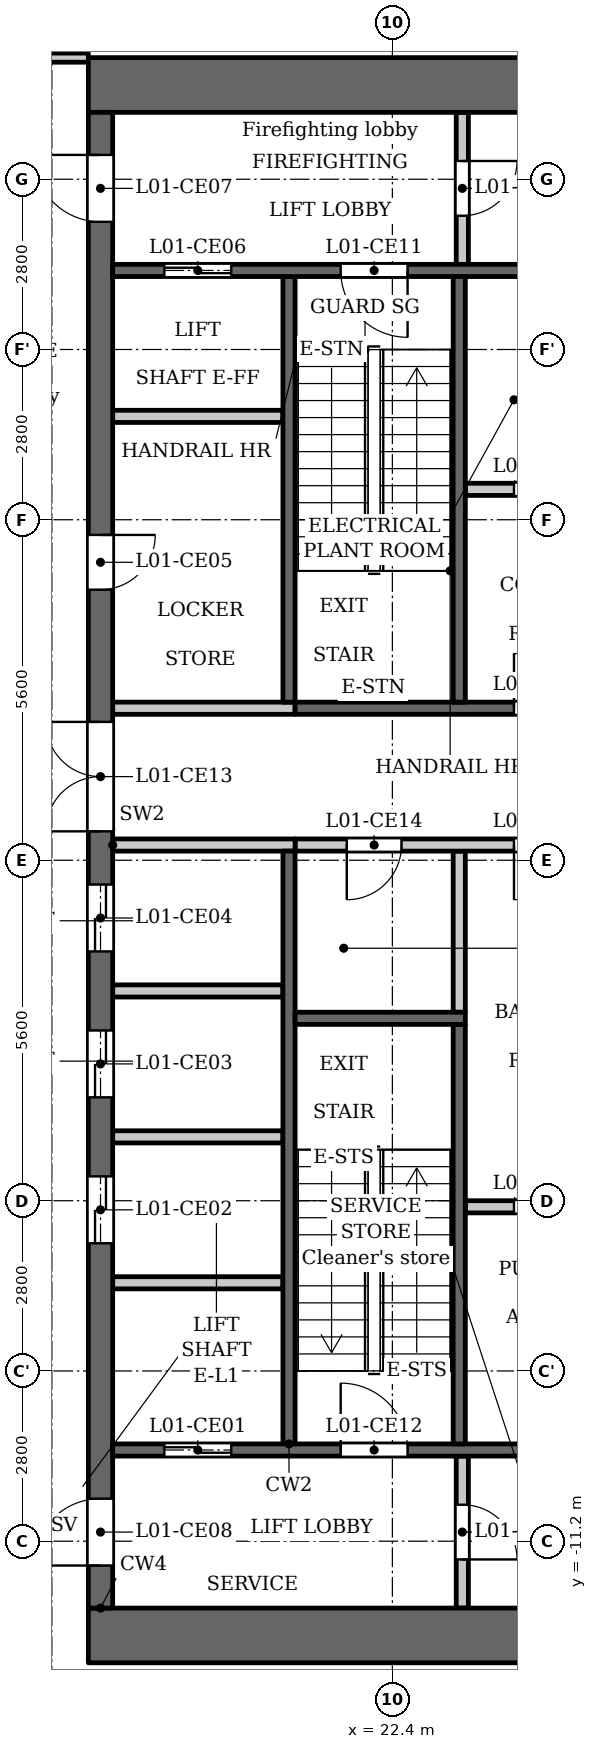
"""IFC4 building model, lengths in metres.
Left out: names, types, materials, properties, quantities, classifications, styles, units other than length and angle.
Written with IfcOpenShell. Run it as: python <this file> out.ifc"""

import sys

from ifc_helpers import new_model, si_unit, direction, frame, frame_2d, origin, place, context, subcontext, project, spatial, rectangle, extrude, element, fill, save


model = new_model("IFC4")
c1 = context("Model", 3, precision=1e-05, world=origin(), true_north=direction((0.0, 1.0)))
c2 = subcontext(c1, "Body", "Model", "MODEL_VIEW")
j1 = project(units=[si_unit("LENGTHUNIT", "METRE"), si_unit("PLANEANGLEUNIT", "RADIAN")], contexts=[c1])
p1 = place(None, origin())
s1 = spatial("IfcSite", under=j1, at=p1, CompositionType="ELEMENT")
p2 = place(p1, origin())
s2 = spatial("IfcBuilding", under=s1, at=p2, CompositionType="ELEMENT")
p3 = place(p2, frame((0.0, 0.0, 6.5)))
s3 = spatial("IfcBuildingStorey", under=s2, at=p3, CompositionType="ELEMENT", Elevation=6.5)
p4 = place(p3, frame((23.5, -2.5, 0.0), z_axis=(0.0, 0.0, 1.0), x_axis=(0.0, 1.0, 0.0)))
e1 = element("IfcWall", 1, at=p4, inside=s3, PredefinedType="PARTITIONING", context=c2, shape_type="SweptSolid", body=[
    extrude(rectangle(XDim=2.65, YDim=0.2, at=frame_2d((1.325, 0.0))), origin(), (0.0, 0.0, 1.0), 4.45),
])
p5 = place(p3, frame((20.7, 2.6, 0.0), z_axis=(0.0, 0.0, 1.0), x_axis=(0.0, 1.0, 0.0)))
e2 = element("IfcWall", 2, at=p5, inside=s3, PredefinedType="SHEAR", context=c2, shape_type="SweptSolid", body=[
    extrude(rectangle(XDim=7.0, YDim=0.2, at=frame_2d((3.5, 0.0))), origin(), (0.0, 0.0, 1.0), 4.45),
])
p6 = place(p3, frame((20.7, -9.6, 0.0), z_axis=(0.0, 0.0, 1.0), x_axis=(0.0, 1.0, 0.0)))
e3 = element("IfcWall", 3, at=p6, inside=s3, PredefinedType="SHEAR", context=c2, shape_type="SweptSolid", body=[
    extrude(rectangle(XDim=9.75, YDim=0.2, at=frame_2d((4.875, 0.0))), origin(), (0.0, 0.0, 1.0), 4.45),
])
p7 = place(p3, frame((20.8, 2.5, 0.0), z_axis=(0.0, 0.0, 1.0), x_axis=(1.0, 0.0, 0.0)))
e4 = element("IfcWall", 4, at=p7, inside=s3, PredefinedType="SHEAR", context=c2, shape_type="SweptSolid", body=[
    extrude(rectangle(XDim=5.3, YDim=0.2, at=frame_2d((2.65, 0.0))), origin(), (0.0, 0.0, 1.0), 4.45),
])
p8 = place(p7, frame((3.6, 0.0, 0.0)))
e5 = element("IfcOpeningElement", 5, at=p8, cuts=e4, PredefinedType="OPENING", context=c2, shape_type="SweptSolid", body=[
    extrude(rectangle(XDim=0.9, YDim=2.1, at=frame_2d((0.45, 1.05))), frame((0.0, 0.11, 0.0), z_axis=(0.0, -1.0, 0.0), x_axis=(1.0, 0.0, 0.0)), (0.0, 0.0, 1.0), 0.22),
])
p9 = place(p3, frame((20.8, 0.25, 0.0), z_axis=(0.0, 0.0, 1.0), x_axis=(1.0, 0.0, 0.0)))
e6 = element("IfcWall", 6, at=p9, inside=s3, PredefinedType="PARTITIONING", context=c2, shape_type="SweptSolid", body=[
    extrude(rectangle(XDim=5.3, YDim=0.2, at=frame_2d((2.65, 0.0))), origin(), (0.0, 0.0, 1.0), 4.45),
])
p10 = place(p9, frame((0.85, 0.0, 0.0)))
e7 = element("IfcOpeningElement", 7, at=p10, cuts=e6, PredefinedType="OPENING", context=c2, shape_type="SweptSolid", body=[
    extrude(rectangle(XDim=0.9, YDim=2.1, at=frame_2d((0.45, 1.05))), frame((0.0, 0.11, 0.0), z_axis=(0.0, -1.0, 0.0), x_axis=(1.0, 0.0, 0.0)), (0.0, 0.0, 1.0), 0.22),
])
p11 = place(p9, frame((3.6, 0.0, 0.0)))
e8 = element("IfcOpeningElement", 8, at=p11, cuts=e6, PredefinedType="OPENING", context=c2, shape_type="SweptSolid", body=[
    extrude(rectangle(XDim=0.9, YDim=2.1, at=frame_2d((0.45, 1.05))), frame((0.0, 0.11, 0.0), z_axis=(0.0, -1.0, 0.0), x_axis=(1.0, 0.0, 0.0)), (0.0, 0.0, 1.0), 0.22),
])
for number, where, z_axis, x_axis in (
    (9, (17.4, 12.75, 0.0), (0.0, 0.0, 1.0), (1.0, 0.0, 0.0)),
    (10, (17.4, -12.75, 0.0), (0.0, 0.0, 1.0), (1.0, 0.0, 0.0)),
):
    element("IfcWall", number, at=place(p3, frame(where, z_axis=z_axis, x_axis=x_axis)), inside=s3, PredefinedType="SHEAR", context=c2, shape_type="SweptSolid", body=[
        extrude(rectangle(XDim=10.4, YDim=0.9, at=frame_2d((5.2, 0.0))), origin(), (0.0, 0.0, 1.0), 4.45),
    ])
p12 = place(p3, frame((17.6, -12.3, 0.0), z_axis=(0.0, 0.0, 1.0), x_axis=(0.0, 1.0, 0.0)))
e11 = element("IfcWall", 11, at=p12, inside=s3, PredefinedType="SHEAR", context=c2, shape_type="SweptSolid", body=[
    extrude(rectangle(XDim=24.6, YDim=0.4, at=frame_2d((12.3, 0.0))), origin(), (0.0, 0.0, 1.0), 4.45),
])
p13 = place(p12, frame((6.0, 0.0, 0.0)))
e12 = element("IfcOpeningElement", 12, at=p13, cuts=e11, PredefinedType="OPENING", context=c2, shape_type="SweptSolid", body=[
    extrude(rectangle(XDim=1.1, YDim=2.1, at=frame_2d((0.55, 1.05))), frame((0.0, 0.21, 0.0), z_axis=(0.0, -1.0, 0.0), x_axis=(1.0, 0.0, 0.0)), (0.0, 0.0, 1.0), 0.42),
])
p14 = place(p12, frame((8.4, 0.0, 0.0)))
e13 = element("IfcOpeningElement", 13, at=p14, cuts=e11, PredefinedType="OPENING", context=c2, shape_type="SweptSolid", body=[
    extrude(rectangle(XDim=1.1, YDim=2.1, at=frame_2d((0.55, 1.05))), frame((0.0, 0.21, 0.0), z_axis=(0.0, -1.0, 0.0), x_axis=(1.0, 0.0, 0.0)), (0.0, 0.0, 1.0), 0.42),
])
p15 = place(p12, frame((10.8, 0.0, 0.0)))
e14 = element("IfcOpeningElement", 14, at=p15, cuts=e11, PredefinedType="OPENING", context=c2, shape_type="SweptSolid", body=[
    extrude(rectangle(XDim=1.1, YDim=2.1, at=frame_2d((0.55, 1.05))), frame((0.0, 0.21, 0.0), z_axis=(0.0, -1.0, 0.0), x_axis=(1.0, 0.0, 0.0)), (0.0, 0.0, 1.0), 0.42),
])
p16 = place(p12, frame((16.75, 0.0, 0.0)))
e15 = element("IfcOpeningElement", 15, at=p16, cuts=e11, PredefinedType="OPENING", context=c2, shape_type="SweptSolid", body=[
    extrude(rectangle(XDim=0.9, YDim=2.1, at=frame_2d((0.45, 1.05))), frame((0.0, 0.21, 0.0), z_axis=(0.0, -1.0, 0.0), x_axis=(1.0, 0.0, 0.0)), (0.0, 0.0, 1.0), 0.42),
])
p17 = place(p12, frame((22.8, 0.0, 0.0)))
e16 = element("IfcOpeningElement", 16, at=p17, cuts=e11, PredefinedType="OPENING", context=c2, shape_type="SweptSolid", body=[
    extrude(rectangle(XDim=1.1, YDim=2.1, at=frame_2d((0.55, 1.05))), frame((0.0, 0.21, 0.0), z_axis=(0.0, -1.0, 0.0), x_axis=(1.0, 0.0, 0.0)), (0.0, 0.0, 1.0), 0.42),
])
p18 = place(p12, frame((0.7, 0.0, 0.0)))
e17 = element("IfcOpeningElement", 17, at=p18, cuts=e11, PredefinedType="OPENING", context=c2, shape_type="SweptSolid", body=[
    extrude(rectangle(XDim=1.1, YDim=2.1, at=frame_2d((0.55, 1.05))), frame((0.0, 0.21, 0.0), z_axis=(0.0, -1.0, 0.0), x_axis=(1.0, 0.0, 0.0)), (0.0, 0.0, 1.0), 0.42),
])
p19 = place(p12, frame((12.775, 0.0, 0.0)))
e18 = element("IfcOpeningElement", 18, at=p19, cuts=e11, PredefinedType="OPENING", context=c2, shape_type="SweptSolid", body=[
    extrude(rectangle(XDim=1.8, YDim=2.1, at=frame_2d((0.9, 1.05))), frame((0.0, 0.21, 0.0), z_axis=(0.0, -1.0, 0.0), x_axis=(1.0, 0.0, 0.0)), (0.0, 0.0, 1.0), 0.42),
])
p20 = place(p3, frame((23.55, 9.8, 0.0), z_axis=(0.0, 0.0, 1.0), x_axis=(0.0, 1.0, 0.0)))
e19 = element("IfcWall", 19, at=p20, inside=s3, PredefinedType="PARTITIONING", context=c2, shape_type="SweptSolid", body=[
    extrude(rectangle(XDim=2.5, YDim=0.2, at=frame_2d((1.25, 0.0))), origin(), (0.0, 0.0, 1.0), 4.45),
])
p21 = place(p20, frame((0.8, 0.0, 0.0)))
e20 = element("IfcOpeningElement", 20, at=p21, cuts=e19, PredefinedType="OPENING", context=c2, shape_type="SweptSolid", body=[
    extrude(rectangle(XDim=0.9, YDim=2.1, at=frame_2d((0.45, 1.05))), frame((0.0, 0.11, 0.0), z_axis=(0.0, -1.0, 0.0), x_axis=(1.0, 0.0, 0.0)), (0.0, 0.0, 1.0), 0.22),
])
p22 = place(p3, frame((23.55, -12.3, 0.0), z_axis=(0.0, 0.0, 1.0), x_axis=(0.0, 1.0, 0.0)))
e21 = element("IfcWall", 21, at=p22, inside=s3, PredefinedType="PARTITIONING", context=c2, shape_type="SweptSolid", body=[
    extrude(rectangle(XDim=2.5, YDim=0.2, at=frame_2d((1.25, 0.0))), origin(), (0.0, 0.0, 1.0), 4.45),
])
p23 = place(p22, frame((0.8, 0.0, 0.0)))
e22 = element("IfcOpeningElement", 22, at=p23, cuts=e21, PredefinedType="OPENING", context=c2, shape_type="SweptSolid", body=[
    extrude(rectangle(XDim=0.9, YDim=2.1, at=frame_2d((0.45, 1.05))), frame((0.0, 0.11, 0.0), z_axis=(0.0, -1.0, 0.0), x_axis=(1.0, 0.0, 0.0)), (0.0, 0.0, 1.0), 0.22),
])
p24 = place(p3, frame((23.6, -5.7, 0.0), z_axis=(0.0, 0.0, 1.0), x_axis=(1.0, 0.0, 0.0)))
e23 = element("IfcWall", 23, at=p24, inside=s3, PredefinedType="PARTITIONING", context=c2, shape_type="SweptSolid", body=[
    extrude(rectangle(XDim=2.5, YDim=0.2, at=frame_2d((1.25, 0.0))), origin(), (0.0, 0.0, 1.0), 4.45),
])
p25 = place(p24, frame((0.8, 0.0, 0.0)))
e24 = element("IfcOpeningElement", 24, at=p25, cuts=e23, PredefinedType="OPENING", context=c2, shape_type="SweptSolid", body=[
    extrude(rectangle(XDim=0.9, YDim=2.1, at=frame_2d((0.45, 1.05))), frame((0.0, 0.11, 0.0), z_axis=(0.0, -1.0, 0.0), x_axis=(1.0, 0.0, 0.0)), (0.0, 0.0, 1.0), 0.22),
])
p26 = place(p3, frame((23.6, 6.1, 0.0), z_axis=(0.0, 0.0, 1.0), x_axis=(1.0, 0.0, 0.0)))
e25 = element("IfcWall", 25, at=p26, inside=s3, PredefinedType="PARTITIONING", context=c2, shape_type="SweptSolid", body=[
    extrude(rectangle(XDim=2.5, YDim=0.2, at=frame_2d((1.25, 0.0))), origin(), (0.0, 0.0, 1.0), 4.45),
])
p27 = place(p26, frame((0.8, 0.0, 0.0)))
e26 = element("IfcOpeningElement", 26, at=p27, cuts=e25, PredefinedType="OPENING", context=c2, shape_type="SweptSolid", body=[
    extrude(rectangle(XDim=0.9, YDim=2.1, at=frame_2d((0.45, 1.05))), frame((0.0, 0.11, 0.0), z_axis=(0.0, -1.0, 0.0), x_axis=(1.0, 0.0, 0.0)), (0.0, 0.0, 1.0), 0.22),
])
p28 = place(p3, frame((17.8, -9.7, 0.0), z_axis=(0.0, 0.0, 1.0), x_axis=(1.0, 0.0, 0.0)))
e27 = element("IfcWall", 27, at=p28, inside=s3, PredefinedType="SHEAR", context=c2, shape_type="SweptSolid", body=[
    extrude(rectangle(XDim=8.3, YDim=0.2, at=frame_2d((4.15, 0.0))), origin(), (0.0, 0.0, 1.0), 4.45),
])
p29 = place(p28, frame((0.85, 0.0, 0.0)))
e28 = element("IfcOpeningElement", 28, at=p29, cuts=e27, PredefinedType="OPENING", context=c2, shape_type="SweptSolid", body=[
    extrude(rectangle(XDim=1.1, YDim=2.1, at=frame_2d((0.55, 1.05))), frame((0.0, 0.11, 0.0), z_axis=(0.0, -1.0, 0.0), x_axis=(1.0, 0.0, 0.0)), (0.0, 0.0, 1.0), 0.22),
])
p30 = place(p28, frame((3.75, 0.0, 0.0)))
e29 = element("IfcOpeningElement", 29, at=p30, cuts=e27, PredefinedType="OPENING", context=c2, shape_type="SweptSolid", body=[
    extrude(rectangle(XDim=1.1, YDim=2.1, at=frame_2d((0.55, 1.05))), frame((0.0, 0.11, 0.0), z_axis=(0.0, -1.0, 0.0), x_axis=(1.0, 0.0, 0.0)), (0.0, 0.0, 1.0), 0.22),
])
for number, where, z_axis, x_axis in (
    (30, (17.8, -6.95, 0.0), (0.0, 0.0, 1.0), (1.0, 0.0, 0.0)),
    (31, (17.8, -4.55, 0.0), (0.0, 0.0, 1.0), (1.0, 0.0, 0.0)),
    (32, (17.8, -2.15, 0.0), (0.0, 0.0, 1.0), (1.0, 0.0, 0.0)),
):
    element("IfcWall", number, at=place(p3, frame(where, z_axis=z_axis, x_axis=x_axis)), inside=s3, PredefinedType="PARTITIONING", context=c2, shape_type="SweptSolid", body=[
        extrude(rectangle(XDim=2.8, YDim=0.2, at=frame_2d((1.4, 0.0))), origin(), (0.0, 0.0, 1.0), 4.45),
    ])
for number, where, z_axis, x_axis in (
    (33, (17.8, 0.25, 0.0), (0.0, 0.0, 1.0), (1.0, 0.0, 0.0)),
    (34, (17.8, 2.5, 0.0), (0.0, 0.0, 1.0), (1.0, 0.0, 0.0)),
):
    element("IfcWall", number, at=place(p3, frame(where, z_axis=z_axis, x_axis=x_axis)), inside=s3, PredefinedType="PARTITIONING", context=c2, shape_type="SweptSolid", body=[
        extrude(rectangle(XDim=3.0, YDim=0.2, at=frame_2d((1.5, 0.0))), origin(), (0.0, 0.0, 1.0), 4.45),
    ])
p31 = place(p3, frame((17.8, 7.3, 0.0), z_axis=(0.0, 0.0, 1.0), x_axis=(1.0, 0.0, 0.0)))
e35 = element("IfcWall", 35, at=p31, inside=s3, PredefinedType="PARTITIONING", context=c2, shape_type="SweptSolid", body=[
    extrude(rectangle(XDim=2.8, YDim=0.2, at=frame_2d((1.4, 0.0))), origin(), (0.0, 0.0, 1.0), 4.45),
])
p32 = place(p3, frame((17.8, 9.7, 0.0), z_axis=(0.0, 0.0, 1.0), x_axis=(1.0, 0.0, 0.0)))
e36 = element("IfcWall", 36, at=p32, inside=s3, PredefinedType="SHEAR", context=c2, shape_type="SweptSolid", body=[
    extrude(rectangle(XDim=8.3, YDim=0.2, at=frame_2d((4.15, 0.0))), origin(), (0.0, 0.0, 1.0), 4.45),
])
p33 = place(p32, frame((0.85, 0.0, 0.0)))
e37 = element("IfcOpeningElement", 37, at=p33, cuts=e36, PredefinedType="OPENING", context=c2, shape_type="SweptSolid", body=[
    extrude(rectangle(XDim=1.1, YDim=2.1, at=frame_2d((0.55, 1.05))), frame((0.0, 0.11, 0.0), z_axis=(0.0, -1.0, 0.0), x_axis=(1.0, 0.0, 0.0)), (0.0, 0.0, 1.0), 0.22),
])
p34 = place(p32, frame((3.75, 0.0, 0.0)))
e38 = element("IfcOpeningElement", 38, at=p34, cuts=e36, PredefinedType="OPENING", context=c2, shape_type="SweptSolid", body=[
    extrude(rectangle(XDim=1.1, YDim=2.1, at=frame_2d((0.55, 1.05))), frame((0.0, 0.11, 0.0), z_axis=(0.0, -1.0, 0.0), x_axis=(1.0, 0.0, 0.0)), (0.0, 0.0, 1.0), 0.22),
])
p35 = place(p3, frame((23.5, 2.6, 0.0), z_axis=(0.0, 0.0, 1.0), x_axis=(0.0, 1.0, 0.0)))
e39 = element("IfcWall", 39, at=p35, inside=s3, PredefinedType="SHEAR", context=c2, shape_type="SweptSolid", body=[
    extrude(rectangle(XDim=7.0, YDim=0.2, at=frame_2d((3.5, 0.0))), origin(), (0.0, 0.0, 1.0), 4.45),
])
p36 = place(p3, frame((23.5, -9.6, 0.0), z_axis=(0.0, 0.0, 1.0), x_axis=(0.0, 1.0, 0.0)))
e40 = element("IfcWall", 40, at=p36, inside=s3, PredefinedType="SHEAR", context=c2, shape_type="SweptSolid", body=[
    extrude(rectangle(XDim=6.9, YDim=0.2, at=frame_2d((3.45, 0.0))), origin(), (0.0, 0.0, 1.0), 4.45),
])
p37 = place(p3, frame((20.8, -2.6, 0.0), z_axis=(0.0, 0.0, 1.0), x_axis=(1.0, 0.0, 0.0)))
e41 = element("IfcWall", 41, at=p37, inside=s3, PredefinedType="SHEAR", context=c2, shape_type="SweptSolid", body=[
    extrude(rectangle(XDim=2.8, YDim=0.2, at=frame_2d((1.4, 0.0))), origin(), (0.0, 0.0, 1.0), 4.45),
])
p38 = place(p3, frame((-17.4, 13.2, 0.0), z_axis=(0.0, 0.0, 1.0), x_axis=(1.0, 0.0, 0.0)))
e42 = element("IfcWall", 42, at=p38, inside=s3, PredefinedType="PARTITIONING", context=c2, shape_type="SweptSolid", body=[
    extrude(rectangle(XDim=34.8, YDim=0.15, at=frame_2d((17.4, 0.0))), origin(), (0.0, 0.0, 1.0), 4.45),
])
p39 = place(p38, frame((3.05, 0.0, 0.0)))
e43 = element("IfcOpeningElement", 43, at=p39, cuts=e42, PredefinedType="OPENING", context=c2, shape_type="SweptSolid", body=[
    extrude(rectangle(XDim=1.8, YDim=2.1, at=frame_2d((0.9, 1.05))), frame((0.0, 0.085, 0.0), z_axis=(0.0, -1.0, 0.0), x_axis=(1.0, 0.0, 0.0)), (0.0, 0.0, 1.0), 0.17),
])
p40 = place(p38, frame((0.75, 0.0, 0.0)))
e44 = element("IfcOpeningElement", 44, at=p40, cuts=e42, PredefinedType="OPENING", context=c2, shape_type="SweptSolid", body=[
    extrude(rectangle(XDim=1.0, YDim=2.1, at=frame_2d((0.5, 1.05))), frame((0.0, 0.085, 0.0), z_axis=(0.0, -1.0, 0.0), x_axis=(1.0, 0.0, 0.0)), (0.0, 0.0, 1.0), 0.17),
])
p41 = place(p38, frame((33.15, 0.0, 0.0)))
e45 = element("IfcOpeningElement", 45, at=p41, cuts=e42, PredefinedType="OPENING", context=c2, shape_type="SweptSolid", body=[
    extrude(rectangle(XDim=1.0, YDim=2.1, at=frame_2d((0.5, 1.05))), frame((0.0, 0.085, 0.0), z_axis=(0.0, -1.0, 0.0), x_axis=(1.0, 0.0, 0.0)), (0.0, 0.0, 1.0), 0.17),
])
p42 = place(p29, origin())
e46 = element("IfcDoor", 46, at=p42, inside=s3, OperationType="DOUBLE_DOOR_SLIDING", PredefinedType="DOOR", context=c2, shape_type="SweptSolid", body=[
    extrude(rectangle(XDim=1.1, YDim=2.1, at=frame_2d((0.55, 1.05))), frame((0.0, 0.025, 0.0), z_axis=(0.0, -1.0, 0.0), x_axis=(1.0, 0.0, 0.0)), (0.0, 0.0, 1.0), 0.05),
])
fill(e28, e46)
p43 = place(p13, origin())
e47 = element("IfcDoor", 47, at=p43, inside=s3, OperationType="DOUBLE_DOOR_SLIDING", PredefinedType="DOOR", context=c2, shape_type="SweptSolid", body=[
    extrude(rectangle(XDim=1.1, YDim=2.1, at=frame_2d((0.55, 1.05))), frame((0.0, 0.025, 0.0), z_axis=(0.0, -1.0, 0.0), x_axis=(1.0, 0.0, 0.0)), (0.0, 0.0, 1.0), 0.05),
])
fill(e12, e47)
p44 = place(p14, origin())
e48 = element("IfcDoor", 48, at=p44, inside=s3, OperationType="DOUBLE_DOOR_SLIDING", PredefinedType="DOOR", context=c2, shape_type="SweptSolid", body=[
    extrude(rectangle(XDim=1.1, YDim=2.1, at=frame_2d((0.55, 1.05))), frame((0.0, 0.025, 0.0), z_axis=(0.0, -1.0, 0.0), x_axis=(1.0, 0.0, 0.0)), (0.0, 0.0, 1.0), 0.05),
])
fill(e13, e48)
p45 = place(p15, origin())
e49 = element("IfcDoor", 49, at=p45, inside=s3, OperationType="DOUBLE_DOOR_SLIDING", PredefinedType="DOOR", context=c2, shape_type="SweptSolid", body=[
    extrude(rectangle(XDim=1.1, YDim=2.1, at=frame_2d((0.55, 1.05))), frame((0.0, 0.025, 0.0), z_axis=(0.0, -1.0, 0.0), x_axis=(1.0, 0.0, 0.0)), (0.0, 0.0, 1.0), 0.05),
])
fill(e14, e49)
p46 = place(p16, origin())
e50 = element("IfcDoor", 50, at=p46, inside=s3, OperationType="SINGLE_SWING_RIGHT", PredefinedType="DOOR", context=c2, shape_type="SweptSolid", body=[
    extrude(rectangle(XDim=0.9, YDim=2.1, at=frame_2d((0.45, 1.05))), frame((0.0, 0.025, 0.0), z_axis=(0.0, -1.0, 0.0), x_axis=(1.0, 0.0, 0.0)), (0.0, 0.0, 1.0), 0.05),
])
fill(e15, e50)
p47 = place(p33, origin())
e51 = element("IfcDoor", 51, at=p47, inside=s3, OperationType="DOUBLE_DOOR_SLIDING", PredefinedType="DOOR", context=c2, shape_type="SweptSolid", body=[
    extrude(rectangle(XDim=1.1, YDim=2.1, at=frame_2d((0.55, 1.05))), frame((0.0, 0.025, 0.0), z_axis=(0.0, -1.0, 0.0), x_axis=(1.0, 0.0, 0.0)), (0.0, 0.0, 1.0), 0.05),
])
fill(e37, e51)
p48 = place(p17, origin())
e52 = element("IfcDoor", 52, at=p48, inside=s3, OperationType="SINGLE_SWING_LEFT", PredefinedType="DOOR", context=c2, shape_type="SweptSolid", body=[
    extrude(rectangle(XDim=1.1, YDim=2.1, at=frame_2d((0.55, 1.05))), frame((0.0, 0.025, 0.0), z_axis=(0.0, -1.0, 0.0), x_axis=(1.0, 0.0, 0.0)), (0.0, 0.0, 1.0), 0.05),
])
fill(e16, e52)
p49 = place(p18, origin())
e53 = element("IfcDoor", 53, at=p49, inside=s3, OperationType="SINGLE_SWING_RIGHT", PredefinedType="DOOR", context=c2, shape_type="SweptSolid", body=[
    extrude(rectangle(XDim=1.1, YDim=2.1, at=frame_2d((0.55, 1.05))), frame((0.0, 0.025, 0.0), z_axis=(0.0, -1.0, 0.0), x_axis=(1.0, 0.0, 0.0)), (0.0, 0.0, 1.0), 0.05),
])
fill(e17, e53)
p50 = place(p21, origin())
e54 = element("IfcDoor", 54, at=p50, inside=s3, OperationType="SINGLE_SWING_RIGHT", PredefinedType="DOOR", context=c2, shape_type="SweptSolid", body=[
    extrude(rectangle(XDim=0.9, YDim=2.1, at=frame_2d((0.45, 1.05))), frame((0.0, 0.025, 0.0), z_axis=(0.0, -1.0, 0.0), x_axis=(1.0, 0.0, 0.0)), (0.0, 0.0, 1.0), 0.05),
])
fill(e20, e54)
p51 = place(p23, origin())
e55 = element("IfcDoor", 55, at=p51, inside=s3, OperationType="SINGLE_SWING_LEFT", PredefinedType="DOOR", context=c2, shape_type="SweptSolid", body=[
    extrude(rectangle(XDim=0.9, YDim=2.1, at=frame_2d((0.45, 1.05))), frame((0.0, 0.025, 0.0), z_axis=(0.0, -1.0, 0.0), x_axis=(1.0, 0.0, 0.0)), (0.0, 0.0, 1.0), 0.05),
])
fill(e22, e55)
p52 = place(p34, origin())
e56 = element("IfcDoor", 56, at=p52, inside=s3, OperationType="SINGLE_SWING_RIGHT", PredefinedType="DOOR", context=c2, shape_type="SweptSolid", body=[
    extrude(rectangle(XDim=1.1, YDim=2.1, at=frame_2d((0.55, 1.05))), frame((0.0, 0.025, 0.0), z_axis=(0.0, -1.0, 0.0), x_axis=(1.0, 0.0, 0.0)), (0.0, 0.0, 1.0), 0.05),
])
fill(e38, e56)
p53 = place(p30, origin())
e57 = element("IfcDoor", 57, at=p53, inside=s3, OperationType="SINGLE_SWING_RIGHT", PredefinedType="DOOR", context=c2, shape_type="SweptSolid", body=[
    extrude(rectangle(XDim=1.1, YDim=2.1, at=frame_2d((0.55, 1.05))), frame((0.0, 0.025, 0.0), z_axis=(0.0, -1.0, 0.0), x_axis=(1.0, 0.0, 0.0)), (0.0, 0.0, 1.0), 0.05),
])
fill(e29, e57)
p54 = place(p19, origin())
e58 = element("IfcDoor", 58, at=p54, inside=s3, OperationType="DOUBLE_DOOR_SINGLE_SWING", PredefinedType="DOOR", context=c2, shape_type="SweptSolid", body=[
    extrude(rectangle(XDim=1.8, YDim=2.1, at=frame_2d((0.9, 1.05))), frame((0.0, 0.025, 0.0), z_axis=(0.0, -1.0, 0.0), x_axis=(1.0, 0.0, 0.0)), (0.0, 0.0, 1.0), 0.05),
])
fill(e18, e58)
p55 = place(p10, origin())
e59 = element("IfcDoor", 59, at=p55, inside=s3, OperationType="SINGLE_SWING_LEFT", PredefinedType="DOOR", context=c2, shape_type="SweptSolid", body=[
    extrude(rectangle(XDim=0.9, YDim=2.1, at=frame_2d((0.45, 1.05))), frame((0.0, 0.025, 0.0), z_axis=(0.0, -1.0, 0.0), x_axis=(1.0, 0.0, 0.0)), (0.0, 0.0, 1.0), 0.05),
])
fill(e7, e59)
p56 = place(p25, origin())
e60 = element("IfcDoor", 60, at=p56, inside=s3, OperationType="SINGLE_SWING_LEFT", PredefinedType="DOOR", context=c2, shape_type="SweptSolid", body=[
    extrude(rectangle(XDim=0.9, YDim=2.1, at=frame_2d((0.45, 1.05))), frame((0.0, 0.025, 0.0), z_axis=(0.0, -1.0, 0.0), x_axis=(1.0, 0.0, 0.0)), (0.0, 0.0, 1.0), 0.05),
])
fill(e24, e60)
p57 = place(p11, origin())
e61 = element("IfcDoor", 61, at=p57, inside=s3, OperationType="SINGLE_SWING_LEFT", PredefinedType="DOOR", context=c2, shape_type="SweptSolid", body=[
    extrude(rectangle(XDim=0.9, YDim=2.1, at=frame_2d((0.45, 1.05))), frame((0.0, 0.025, 0.0), z_axis=(0.0, -1.0, 0.0), x_axis=(1.0, 0.0, 0.0)), (0.0, 0.0, 1.0), 0.05),
])
fill(e8, e61)
p58 = place(p27, origin())
e62 = element("IfcDoor", 62, at=p58, inside=s3, OperationType="SINGLE_SWING_LEFT", PredefinedType="DOOR", context=c2, shape_type="SweptSolid", body=[
    extrude(rectangle(XDim=0.9, YDim=2.1, at=frame_2d((0.45, 1.05))), frame((0.0, 0.025, 0.0), z_axis=(0.0, -1.0, 0.0), x_axis=(1.0, 0.0, 0.0)), (0.0, 0.0, 1.0), 0.05),
])
fill(e26, e62)
p59 = place(p8, origin())
e63 = element("IfcDoor", 63, at=p59, inside=s3, OperationType="SINGLE_SWING_RIGHT", PredefinedType="DOOR", context=c2, shape_type="SweptSolid", body=[
    extrude(rectangle(XDim=0.9, YDim=2.1, at=frame_2d((0.45, 1.05))), frame((0.0, 0.025, 0.0), z_axis=(0.0, -1.0, 0.0), x_axis=(1.0, 0.0, 0.0)), (0.0, 0.0, 1.0), 0.05),
])
fill(e5, e63)
save(model, sys.argv[1])
